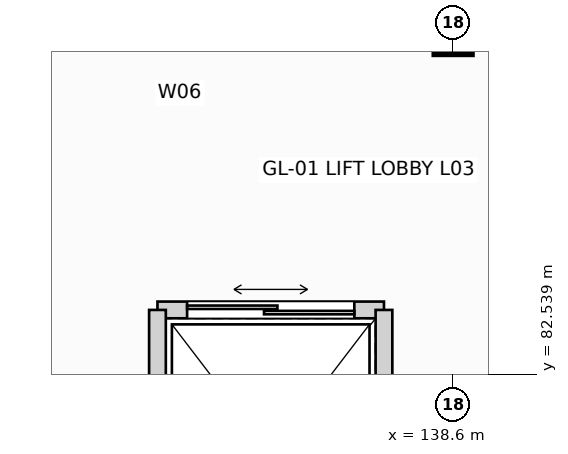
"""IFC4 building model, lengths in metres.
Left out: names, types, materials, properties, quantities, classifications, styles, units other than length and angle.
Written with IfcOpenShell. Run it as: python <this file> out.ifc"""

import sys

from ifc_helpers import new_model, si_unit, direction, frame, frame_2d, origin, origin_2d, place, context, subcontext, project, spatial, rectangle, extrude, element, fill, save


model = new_model("IFC4")
c1 = context("Model", 3, precision=1e-05, world=origin(), true_north=direction((0.0, 1.0)))
c2 = subcontext(c1, "Body", "Model", "MODEL_VIEW")
j1 = project(units=[si_unit("LENGTHUNIT", "METRE"), si_unit("PLANEANGLEUNIT", "RADIAN")], contexts=[c1])
p1 = place(None, origin())
s1 = spatial("IfcSite", under=j1, at=p1, CompositionType="ELEMENT")
p2 = place(p1, origin())
s2 = spatial("IfcBuilding", under=s1, at=p2, CompositionType="ELEMENT")
p3 = place(p2, frame((0.0, 0.0, 16.8)))
s3 = spatial("IfcBuildingStorey", under=s2, at=p3, CompositionType="ELEMENT", Elevation=16.8)
p4 = place(p3, frame((138.6, 87.0, 0.0), z_axis=(0.0, 0.0, 1.0), x_axis=(1.0, 0.0, 0.0)))
e1 = element("IfcColumn", 1, at=p4, inside=s3, PredefinedType="COLUMN", context=c2, shape_type="SweptSolid", body=[
    extrude(rectangle(XDim=0.5, YDim=0.5, at=origin_2d()), origin(), (0.0, 0.0, 1.0), 4.8),
])
p5 = place(p3, frame((134.71, 83.39, 0.0), z_axis=(0.0, 0.0, 1.0), x_axis=(1.0, 0.0, 0.0)))
e2 = element("IfcWall", 2, at=p5, inside=s3, PredefinedType="PARTITIONING", context=c2, shape_type="SweptSolid", body=[
    extrude(rectangle(XDim=2.98, YDim=0.22, at=frame_2d((1.49, 0.0))), origin(), (0.0, 0.0, 1.0), 4.485),
])
p6 = place(p5, frame((0.39, 0.0, 0.0)))
e3 = element("IfcOpeningElement", 3, at=p6, cuts=e2, PredefinedType="OPENING", context=c2, shape_type="SweptSolid", body=[
    extrude(rectangle(XDim=2.2, YDim=2.5, at=frame_2d((1.1, 1.25))), frame((0.0, 0.12, 0.0), z_axis=(0.0, -1.0, 0.0), x_axis=(1.0, 0.0, 0.0)), (0.0, 0.0, 1.0), 0.24),
])
for number, where, z_axis, x_axis in (
    (4, (134.71, 79.61, 0.0), (0.0, 0.0, 1.0), (0.0, 1.0, 0.0)),
    (5, (137.69, 79.61, 0.0), (0.0, 0.0, 1.0), (0.0, 1.0, 0.0)),
):
    element("IfcWall", number, at=place(p3, frame(where, z_axis=z_axis, x_axis=x_axis)), inside=s3, PredefinedType="PARTITIONING", context=c2, shape_type="SweptSolid", body=[
        extrude(rectangle(XDim=3.78, YDim=0.22, at=frame_2d((1.89, 0.0))), origin(), (0.0, 0.0, 1.0), 4.215),
    ])
p7 = place(p6, origin())
e6 = element("IfcDoor", 6, at=p7, inside=s3, OperationType="DOUBLE_DOOR_SLIDING", PredefinedType="DOOR", context=c2, shape_type="SweptSolid", body=[
    extrude(rectangle(XDim=2.2, YDim=2.5, at=frame_2d((1.1, 1.25))), frame((0.0, 0.025, 0.0), z_axis=(0.0, -1.0, 0.0), x_axis=(1.0, 0.0, 0.0)), (0.0, 0.0, 1.0), 0.05),
])
fill(e3, e6)
save(model, sys.argv[1])
